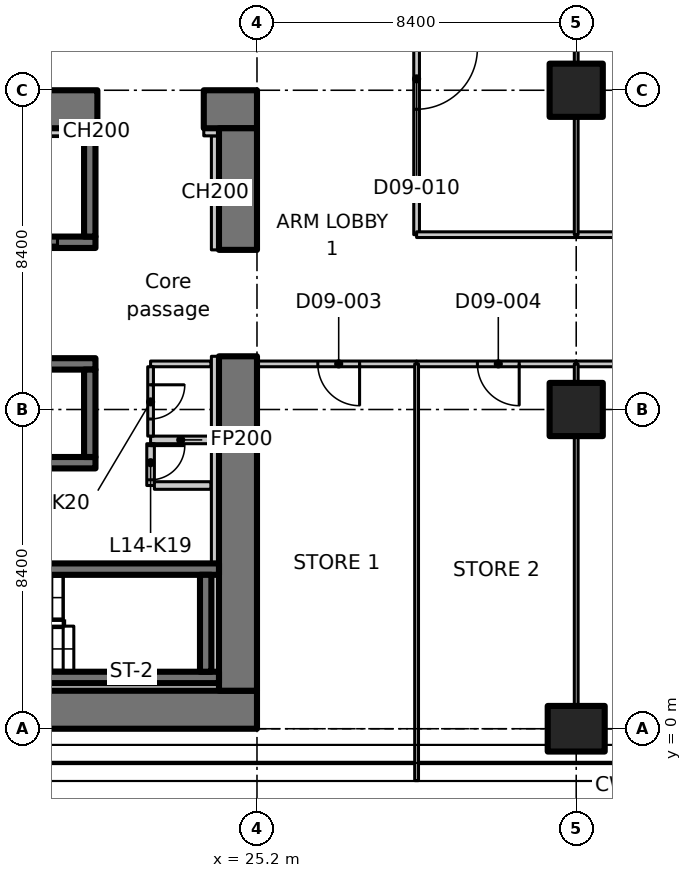
"""IFC4 building model, lengths in metres.
Left out: names, types, materials, properties, quantities, classifications, styles, units other than length and angle.
Written with IfcOpenShell. Run it as: python <this file> out.ifc"""

import sys

from ifc_helpers import new_model, si_unit, direction, frame, frame_2d, origin, origin_2d, place, context, subcontext, project, spatial, polyline, rectangle, outline, extrude, element, fill, save


model = new_model("IFC4")
c1 = context("Model", 3, precision=1e-05, world=origin(), true_north=direction((0.0, 1.0)))
c2 = subcontext(c1, "Body", "Model", "MODEL_VIEW")
j1 = project(units=[si_unit("LENGTHUNIT", "METRE"), si_unit("PLANEANGLEUNIT", "RADIAN")], contexts=[c1])
p1 = place(None, origin())
s1 = spatial("IfcSite", under=j1, at=p1, CompositionType="ELEMENT")
p2 = place(p1, origin())
s2 = spatial("IfcBuilding", under=s1, at=p2, CompositionType="ELEMENT")
p3 = place(p2, frame((0.0, 0.0, 65.3)))
s3 = spatial("IfcBuildingStorey", under=s2, at=p3, CompositionType="ELEMENT", Elevation=65.3)
p4 = place(p3, frame((33.6, 0.0, 0.0), z_axis=(0.0, 0.0, 1.0), x_axis=(0.0, 1.0, 0.0)))
e1 = element("IfcColumn", 1, at=p4, inside=s3, PredefinedType="COLUMN", context=c2, shape_type="SweptSolid", body=[
    extrude(rectangle(XDim=1.2, YDim=1.5, at=origin_2d()), origin(), (0.0, 0.0, 1.0), 3.35),
])
for number, where, z_axis, x_axis in (
    (2, (33.6, 8.4, 0.0), (0.0, 0.0, 1.0), (1.0, 0.0, 0.0)),
    (3, (33.6, 16.8, 0.0), (0.0, 0.0, 1.0), (1.0, 0.0, 0.0)),
):
    element("IfcColumn", number, at=place(p3, frame(where, z_axis=z_axis, x_axis=x_axis)), inside=s3, PredefinedType="COLUMN", context=c2, shape_type="SweptSolid", body=[
        extrude(rectangle(XDim=1.4, YDim=1.4, at=origin_2d()), origin(), (0.0, 0.0, 1.0), 3.35),
    ])
p5 = place(p3, frame((6.936, 0.5, 0.0), z_axis=(0.0, 0.0, 1.0), x_axis=(1.0, 0.0, 0.0)))
e4 = element("IfcWall", 4, at=p5, inside=s3, PredefinedType="SHEAR", context=c2, shape_type="SweptSolid", body=[
    extrude(rectangle(XDim=18.264, YDim=1.0, at=frame_2d((9.132, 0.0))), origin(), (0.0, 0.0, 1.0), 3.35),
])
p6 = place(p3, frame((-1.1, 16.3, 0.0), z_axis=(0.0, 0.0, 1.0), x_axis=(1.0, 0.0, 0.0)))
e5 = element("IfcWall", 5, at=p6, inside=s3, PredefinedType="SHEAR", context=c2, shape_type="SweptSolid", body=[
    extrude(rectangle(XDim=22.1, YDim=1.0, at=frame_2d((11.05, 0.0))), origin(), (0.0, 0.0, 1.0), 3.35),
])
p7 = place(p6, frame((3.15, 0.0, 0.0)))
e6 = element("IfcOpeningElement", 6, at=p7, cuts=e5, PredefinedType="OPENING", context=c2, shape_type="SweptSolid", body=[
    extrude(rectangle(XDim=1.1, YDim=2.3, at=frame_2d((0.55, 1.15))), frame((0.0, 0.51, 0.0), z_axis=(0.0, -1.0, 0.0), x_axis=(1.0, 0.0, 0.0)), (0.0, 0.0, 1.0), 1.02),
])
p8 = place(p3, frame((23.8, 16.3, 0.0), z_axis=(0.0, 0.0, 1.0), x_axis=(1.0, 0.0, 0.0)))
e7 = element("IfcWall", 7, at=p8, inside=s3, PredefinedType="SHEAR", context=c2, shape_type="SweptSolid", body=[
    extrude(rectangle(XDim=1.4, YDim=1.0, at=frame_2d((0.7, 0.0))), origin(), (0.0, 0.0, 1.0), 3.35),
])
p9 = place(p3, frame((24.7, 1.0, 0.0), z_axis=(0.0, 0.0, 1.0), x_axis=(0.0, 1.0, 0.0)))
e8 = element("IfcWall", 8, at=p9, inside=s3, PredefinedType="SHEAR", context=c2, shape_type="SweptSolid", body=[
    extrude(rectangle(XDim=8.8, YDim=1.0, at=frame_2d((4.4, 0.0))), origin(), (0.0, 0.0, 1.0), 3.35),
])
p10 = place(p3, frame((24.7, 12.6, 0.0), z_axis=(0.0, 0.0, 1.0), x_axis=(0.0, 1.0, 0.0)))
e9 = element("IfcWall", 9, at=p10, inside=s3, PredefinedType="SHEAR", context=c2, shape_type="SweptSolid", body=[
    extrude(rectangle(XDim=3.2, YDim=1.0, at=frame_2d((1.6, 0.0))), origin(), (0.0, 0.0, 1.0), 3.35),
])
p11 = place(p3, frame((24.1, 12.6, 0.0), z_axis=(0.0, 0.0, 1.0), x_axis=(0.0, 1.0, 0.0)))
e10 = element("IfcWall", 10, at=p11, inside=s3, PredefinedType="PARTITIONING", context=c2, shape_type="SweptSolid", body=[
    extrude(rectangle(XDim=3.0, YDim=0.2, at=frame_2d((1.5, 0.0))), origin(), (0.0, 0.0, 1.0), 3.35),
])
p12 = place(p3, frame((23.8, 15.7, 0.0), z_axis=(0.0, 0.0, 1.0), x_axis=(1.0, 0.0, 0.0)))
e11 = element("IfcWall", 11, at=p12, inside=s3, PredefinedType="PARTITIONING", context=c2, shape_type="SweptSolid", body=[
    extrude(rectangle(XDim=0.4, YDim=0.2, at=frame_2d((0.2, 0.0))), origin(), (0.0, 0.0, 1.0), 3.35),
])
p13 = place(p3, frame((1.0, 7.0, 0.0), z_axis=(0.0, 0.0, 1.0), x_axis=(1.0, 0.0, 0.0)))
e12 = element("IfcWall", 12, at=p13, inside=s3, PredefinedType="SHEAR", context=c2, shape_type="SweptSolid", body=[
    extrude(rectangle(XDim=19.95, YDim=0.3, at=frame_2d((9.975, 0.0))), origin(), (0.0, 0.0, 1.0), 3.35),
])
p14 = place(p3, frame((1.0, 9.6, 0.0), z_axis=(0.0, 0.0, 1.0), x_axis=(1.0, 0.0, 0.0)))
e13 = element("IfcWall", 13, at=p14, inside=s3, PredefinedType="SHEAR", context=c2, shape_type="SweptSolid", body=[
    extrude(rectangle(XDim=19.95, YDim=0.3, at=frame_2d((9.975, 0.0))), origin(), (0.0, 0.0, 1.0), 3.35),
])
p15 = place(p14, frame((1.05, 0.0, 0.0)))
e14 = element("IfcOpeningElement", 14, at=p15, cuts=e13, PredefinedType="OPENING", context=c2, shape_type="SweptSolid", body=[
    extrude(rectangle(XDim=1.1, YDim=2.3, at=frame_2d((0.55, 1.15))), frame((0.0, 0.16, 0.0), z_axis=(0.0, -1.0, 0.0), x_axis=(1.0, 0.0, 0.0)), (0.0, 0.0, 1.0), 0.32),
])
p16 = place(p14, frame((3.85, 0.0, 0.0)))
e15 = element("IfcOpeningElement", 15, at=p16, cuts=e13, PredefinedType="OPENING", context=c2, shape_type="SweptSolid", body=[
    extrude(rectangle(XDim=1.1, YDim=2.3, at=frame_2d((0.55, 1.15))), frame((0.0, 0.16, 0.0), z_axis=(0.0, -1.0, 0.0), x_axis=(1.0, 0.0, 0.0)), (0.0, 0.0, 1.0), 0.32),
])
p17 = place(p14, frame((6.65, 0.0, 0.0)))
e16 = element("IfcOpeningElement", 16, at=p17, cuts=e13, PredefinedType="OPENING", context=c2, shape_type="SweptSolid", body=[
    extrude(rectangle(XDim=1.1, YDim=2.3, at=frame_2d((0.55, 1.15))), frame((0.0, 0.16, 0.0), z_axis=(0.0, -1.0, 0.0), x_axis=(1.0, 0.0, 0.0)), (0.0, 0.0, 1.0), 0.32),
])
p18 = place(p14, frame((9.45, 0.0, 0.0)))
e17 = element("IfcOpeningElement", 17, at=p18, cuts=e13, PredefinedType="OPENING", context=c2, shape_type="SweptSolid", body=[
    extrude(rectangle(XDim=1.1, YDim=2.3, at=frame_2d((0.55, 1.15))), frame((0.0, 0.16, 0.0), z_axis=(0.0, -1.0, 0.0), x_axis=(1.0, 0.0, 0.0)), (0.0, 0.0, 1.0), 0.32),
])
p19 = place(p14, frame((12.25, 0.0, 0.0)))
e18 = element("IfcOpeningElement", 18, at=p19, cuts=e13, PredefinedType="OPENING", context=c2, shape_type="SweptSolid", body=[
    extrude(rectangle(XDim=1.1, YDim=2.3, at=frame_2d((0.55, 1.15))), frame((0.0, 0.16, 0.0), z_axis=(0.0, -1.0, 0.0), x_axis=(1.0, 0.0, 0.0)), (0.0, 0.0, 1.0), 0.32),
])
p20 = place(p14, frame((15.05, 0.0, 0.0)))
e19 = element("IfcOpeningElement", 19, at=p20, cuts=e13, PredefinedType="OPENING", context=c2, shape_type="SweptSolid", body=[
    extrude(rectangle(XDim=1.1, YDim=2.3, at=frame_2d((0.55, 1.15))), frame((0.0, 0.16, 0.0), z_axis=(0.0, -1.0, 0.0), x_axis=(1.0, 0.0, 0.0)), (0.0, 0.0, 1.0), 0.32),
])
p21 = place(p3, frame((20.8, 7.15, 0.0), z_axis=(0.0, 0.0, 1.0), x_axis=(0.0, 1.0, 0.0)))
e20 = element("IfcWall", 20, at=p21, inside=s3, PredefinedType="SHEAR", context=c2, shape_type="SweptSolid", body=[
    extrude(rectangle(XDim=2.3, YDim=0.3, at=frame_2d((1.15, 0.0))), origin(), (0.0, 0.0, 1.0), 3.35),
])
p22 = place(p3, frame((15.05, 12.8, 0.0), z_axis=(0.0, 0.0, 1.0), x_axis=(1.0, 0.0, 0.0)))
e21 = element("IfcWall", 21, at=p22, inside=s3, PredefinedType="SHEAR", context=c2, shape_type="SweptSolid", body=[
    extrude(rectangle(XDim=5.9, YDim=0.3, at=frame_2d((2.95, 0.0))), origin(), (0.0, 0.0, 1.0), 3.35),
])
p23 = place(p22, frame((3.8, 0.0, 0.0)))
e22 = element("IfcOpeningElement", 22, at=p23, cuts=e21, PredefinedType="OPENING", context=c2, shape_type="SweptSolid", body=[
    extrude(rectangle(XDim=1.1, YDim=2.3, at=frame_2d((0.55, 1.15))), frame((0.0, 0.16, 0.0), z_axis=(0.0, -1.0, 0.0), x_axis=(1.0, 0.0, 0.0)), (0.0, 0.0, 1.0), 0.32),
])
p24 = place(p3, frame((20.8, 12.95, 0.0), z_axis=(0.0, 0.0, 1.0), x_axis=(0.0, 1.0, 0.0)))
e23 = element("IfcWall", 23, at=p24, inside=s3, PredefinedType="SHEAR", context=c2, shape_type="SweptSolid", body=[
    extrude(rectangle(XDim=2.85, YDim=0.3, at=frame_2d((1.425, 0.0))), origin(), (0.0, 0.0, 1.0), 3.35),
])
p25 = place(p3, frame((15.8, 1.35, 0.0), z_axis=(0.0, 0.0, 1.0), x_axis=(1.0, 0.0, 0.0)))
e24 = element("IfcWall", 24, at=p25, inside=s3, PredefinedType="SHEAR", context=c2, shape_type="SweptSolid", body=[
    extrude(rectangle(XDim=8.4, YDim=0.3, at=frame_2d((4.2, 0.0))), origin(), (0.0, 0.0, 1.0), 3.35),
])
p26 = place(p3, frame((15.8, 4.2, 0.0), z_axis=(0.0, 0.0, 1.0), x_axis=(1.0, 0.0, 0.0)))
e25 = element("IfcWall", 25, at=p26, inside=s3, PredefinedType="SHEAR", context=c2, shape_type="SweptSolid", body=[
    extrude(rectangle(XDim=8.4, YDim=0.3, at=frame_2d((4.2, 0.0))), origin(), (0.0, 0.0, 1.0), 3.35),
])
p27 = place(p26, frame((0.4, 0.0, 0.0)))
e26 = element("IfcOpeningElement", 26, at=p27, cuts=e25, PredefinedType="OPENING", context=c2, shape_type="SweptSolid", body=[
    extrude(rectangle(XDim=1.0, YDim=2.1, at=frame_2d((0.5, 1.05))), frame((0.0, 0.16, 0.0), z_axis=(0.0, -1.0, 0.0), x_axis=(1.0, 0.0, 0.0)), (0.0, 0.0, 1.0), 0.32),
])
p28 = place(p3, frame((23.85, 1.5, 0.0), z_axis=(0.0, 0.0, 1.0), x_axis=(0.0, 1.0, 0.0)))
e27 = element("IfcWall", 27, at=p28, inside=s3, PredefinedType="SHEAR", context=c2, shape_type="SweptSolid", body=[
    extrude(rectangle(XDim=2.55, YDim=0.3, at=frame_2d((1.275, 0.0))), origin(), (0.0, 0.0, 1.0), 3.35),
])
p29 = place(p3, frame((23.988, 7.6, 0.0), z_axis=(0.0, 0.0, 1.0), x_axis=(-1.0, 0.0, 0.0)))
e28 = element("IfcWall", 28, at=p29, inside=s3, PredefinedType="PARTITIONING", context=c2, shape_type="SweptSolid", body=[
    extrude(rectangle(XDim=1.588, YDim=0.2, at=frame_2d((0.794, 0.0))), origin(), (0.0, 0.0, 1.0), 3.35),
])
p30 = place(p3, frame((22.4, 7.5, 0.0), z_axis=(0.0, 0.0, 1.0), x_axis=(0.0, -1.0, 0.0)))
e29 = element("IfcWall", 29, at=p30, inside=s3, PredefinedType="PARTITIONING", context=c2, shape_type="SweptSolid", body=[
    extrude(rectangle(XDim=1.1, YDim=0.2, at=frame_2d((0.55, 0.0))), origin(), (0.0, 0.0, 1.0), 3.35),
])
p31 = place(p30, frame((0.05, 0.0, 0.0)))
e30 = element("IfcOpeningElement", 30, at=p31, cuts=e29, PredefinedType="OPENING", context=c2, shape_type="SweptSolid", body=[
    extrude(rectangle(XDim=0.9, YDim=2.1, at=frame_2d((0.45, 1.05))), frame((0.0, 0.11, 0.0), z_axis=(0.0, -1.0, 0.0), x_axis=(1.0, 0.0, 0.0)), (0.0, 0.0, 1.0), 0.22),
])
p32 = place(p3, frame((22.5, 6.4, 0.0), z_axis=(0.0, 0.0, 1.0), x_axis=(1.0, 0.0, 0.0)))
e31 = element("IfcWall", 31, at=p32, inside=s3, PredefinedType="PARTITIONING", context=c2, shape_type="SweptSolid", body=[
    extrude(rectangle(XDim=1.488, YDim=0.2, at=frame_2d((0.744, 0.0))), origin(), (0.0, 0.0, 1.0), 3.35),
])
p33 = place(p3, frame((23.988, 9.6, 0.0), z_axis=(0.0, 0.0, 1.0), x_axis=(-1.0, 0.0, 0.0)))
e32 = element("IfcWall", 32, at=p33, inside=s3, PredefinedType="PARTITIONING", context=c2, shape_type="SweptSolid", body=[
    extrude(rectangle(XDim=1.588, YDim=0.15, at=frame_2d((0.794, 0.0))), origin(), (0.0, 0.0, 1.0), 3.35),
])
p34 = place(p3, frame((22.4, 9.525, 0.0), z_axis=(0.0, 0.0, 1.0), x_axis=(0.0, -1.0, 0.0)))
e33 = element("IfcWall", 33, at=p34, inside=s3, PredefinedType="PARTITIONING", context=c2, shape_type="SweptSolid", body=[
    extrude(rectangle(XDim=1.825, YDim=0.15, at=frame_2d((0.913, 0.0))), origin(), (0.0, 0.0, 1.0), 3.35),
])
p35 = place(p34, frame((0.475, 0.0, 0.0)))
e34 = element("IfcOpeningElement", 34, at=p35, cuts=e33, PredefinedType="OPENING", context=c2, shape_type="SweptSolid", body=[
    extrude(rectangle(XDim=0.9, YDim=2.1, at=frame_2d((0.45, 1.05))), frame((0.0, 0.085, 0.0), z_axis=(0.0, -1.0, 0.0), x_axis=(1.0, 0.0, 0.0)), (0.0, 0.0, 1.0), 0.17),
])
p36 = place(p3, frame((18.15, 15.7, 0.0), z_axis=(0.0, 0.0, 1.0), x_axis=(1.0, 0.0, 0.0)))
e35 = element("IfcWall", 35, at=p36, inside=s3, PredefinedType="PARTITIONING", context=c2, shape_type="SweptSolid", body=[
    extrude(rectangle(XDim=2.5, YDim=0.2, at=frame_2d((1.25, 0.0))), origin(), (0.0, 0.0, 1.0), 3.35),
])
p37 = place(p3, frame((20.95, 15.7, 0.0), z_axis=(0.0, 0.0, 1.0), x_axis=(1.0, 0.0, 0.0)))
e36 = element("IfcWall", 36, at=p37, inside=s3, PredefinedType="PARTITIONING", context=c2, shape_type="SweptSolid", body=[
    extrude(rectangle(XDim=0.05, YDim=0.2, at=frame_2d((0.025, 0.0))), origin(), (0.0, 0.0, 1.0), 3.35),
])
p38 = place(p3, frame((13.35, 1.1, 0.0), z_axis=(0.0, 0.0, 1.0), x_axis=(1.0, 0.0, 0.0)))
e37 = element("IfcWall", 37, at=p38, inside=s3, PredefinedType="PARTITIONING", context=c2, shape_type="SweptSolid", body=[
    extrude(rectangle(XDim=10.85, YDim=0.2, at=frame_2d((5.425, 0.0))), origin(), (0.0, 0.0, 1.0), 3.35),
])
p39 = place(p3, frame((24.1, 1.5, 0.0), z_axis=(0.0, 0.0, 1.0), x_axis=(0.0, 1.0, 0.0)))
e38 = element("IfcWall", 38, at=p39, inside=s3, PredefinedType="PARTITIONING", context=c2, shape_type="SweptSolid", body=[
    extrude(rectangle(XDim=2.55, YDim=0.2, at=frame_2d((1.275, 0.0))), origin(), (0.0, 0.0, 1.0), 3.35),
])
p40 = place(p3, frame((24.1, 4.35, 0.0), z_axis=(0.0, 0.0, 1.0), x_axis=(0.0, 1.0, 0.0)))
e39 = element("IfcWall", 39, at=p40, inside=s3, PredefinedType="PARTITIONING", context=c2, shape_type="SweptSolid", body=[
    extrude(rectangle(XDim=5.45, YDim=0.2, at=frame_2d((2.725, 0.0))), origin(), (0.0, 0.0, 1.0), 3.35),
])
p41 = place(p3, frame((29.4, 9.6, 0.0), z_axis=(0.0, 0.0, 1.0), x_axis=(-1.0, 0.0, 0.0)))
e40 = element("IfcWall", 40, at=p41, inside=s3, PredefinedType="PARTITIONING", context=c2, shape_type="SweptSolid", body=[
    extrude(rectangle(XDim=4.2, YDim=0.15, at=frame_2d((2.1, 0.0))), origin(), (0.0, 0.0, 1.0), 3.33),
])
p42 = place(p41, frame((1.5, 0.0, 0.0)))
e41 = element("IfcOpeningElement", 41, at=p42, cuts=e40, PredefinedType="OPENING", context=c2, shape_type="SweptSolid", body=[
    extrude(rectangle(XDim=1.1, YDim=2.1, at=frame_2d((0.55, 1.05))), frame((0.0, 0.085, 0.0), z_axis=(0.0, -1.0, 0.0), x_axis=(1.0, 0.0, 0.0)), (0.0, 0.0, 1.0), 0.17),
])
p43 = place(p3, frame((29.4, 21.2, 0.0), z_axis=(0.0, 0.0, 1.0), x_axis=(0.0, -1.0, 0.0)))
e42 = element("IfcWall", 42, at=p43, inside=s3, PredefinedType="PARTITIONING", context=c2, shape_type="SweptSolid", body=[
    extrude(rectangle(XDim=8.2, YDim=0.15, at=frame_2d((4.1, 0.0))), origin(), (0.0, 0.0, 1.0), 3.33),
])
p44 = place(p43, frame((3.3, 0.0, 0.0)))
e43 = element("IfcOpeningElement", 43, at=p44, cuts=e42, PredefinedType="OPENING", context=c2, shape_type="SweptSolid", body=[
    extrude(rectangle(XDim=1.6, YDim=2.1, at=frame_2d((0.8, 1.05))), frame((0.0, 0.085, 0.0), z_axis=(0.0, -1.0, 0.0), x_axis=(1.0, 0.0, 0.0)), (0.0, 0.0, 1.0), 0.17),
])
p45 = place(p3, frame((33.6, 9.6, 0.0), z_axis=(0.0, 0.0, 1.0), x_axis=(-1.0, 0.0, 0.0)))
e44 = element("IfcWall", 44, at=p45, inside=s3, PredefinedType="PARTITIONING", context=c2, shape_type="SweptSolid", body=[
    extrude(rectangle(XDim=4.2, YDim=0.15, at=frame_2d((2.1, 0.0))), origin(), (0.0, 0.0, 1.0), 3.33),
])
p46 = place(p45, frame((1.5, 0.0, 0.0)))
e45 = element("IfcOpeningElement", 45, at=p46, cuts=e44, PredefinedType="OPENING", context=c2, shape_type="SweptSolid", body=[
    extrude(rectangle(XDim=1.1, YDim=2.1, at=frame_2d((0.55, 1.05))), frame((0.0, 0.085, 0.0), z_axis=(0.0, -1.0, 0.0), x_axis=(1.0, 0.0, 0.0)), (0.0, 0.0, 1.0), 0.17),
])
p47 = place(p3, frame((42.0, 9.6, 0.0), z_axis=(0.0, 0.0, 1.0), x_axis=(-1.0, 0.0, 0.0)))
e46 = element("IfcWall", 46, at=p47, inside=s3, PredefinedType="PARTITIONING", context=c2, shape_type="SweptSolid", body=[
    extrude(rectangle(XDim=8.4, YDim=0.15, at=frame_2d((4.2, 0.0))), origin(), (0.0, 0.0, 1.0), 3.33),
])
p48 = place(p47, frame((3.3, 0.0, 0.0)))
e47 = element("IfcOpeningElement", 47, at=p48, cuts=e46, PredefinedType="OPENING", context=c2, shape_type="SweptSolid", body=[
    extrude(rectangle(XDim=1.6, YDim=2.1, at=frame_2d((0.8, 1.05))), frame((0.0, 0.085, 0.0), z_axis=(0.0, -1.0, 0.0), x_axis=(1.0, 0.0, 0.0)), (0.0, 0.0, 1.0), 0.17),
])
p49 = place(p3, frame((29.4, 13.0, 0.0), z_axis=(0.0, 0.0, 1.0), x_axis=(1.0, 0.0, 0.0)))
e48 = element("IfcWall", 48, at=p49, inside=s3, PredefinedType="PARTITIONING", context=c2, shape_type="SweptSolid", body=[
    extrude(rectangle(XDim=4.2, YDim=0.15, at=frame_2d((2.1, 0.0))), origin(), (0.0, 0.0, 1.0), 3.33),
])
p50 = place(p3, frame((33.6, 13.0, 0.0), z_axis=(0.0, 0.0, 1.0), x_axis=(1.0, 0.0, 0.0)))
e49 = element("IfcWall", 49, at=p50, inside=s3, PredefinedType="PARTITIONING", context=c2, shape_type="SweptSolid", body=[
    extrude(rectangle(XDim=4.2, YDim=0.15, at=frame_2d((2.1, 0.0))), origin(), (0.0, 0.0, 1.0), 3.33),
])
p51 = place(p50, frame((1.2, 0.0, 0.0)))
e50 = element("IfcOpeningElement", 50, at=p51, cuts=e49, PredefinedType="OPENING", context=c2, shape_type="SweptSolid", body=[
    extrude(rectangle(XDim=1.6, YDim=2.1, at=frame_2d((0.8, 1.05))), frame((0.0, 0.085, 0.0), z_axis=(0.0, -1.0, 0.0), x_axis=(1.0, 0.0, 0.0)), (0.0, 0.0, 1.0), 0.17),
])
p52 = place(p3, frame((29.4, 9.6, 0.0), z_axis=(0.0, 0.0, 1.0), x_axis=(0.0, -1.0, 0.0)))
e51 = element("IfcWall", 51, at=p52, inside=s3, PredefinedType="PARTITIONING", context=c2, shape_type="SweptSolid", body=[
    extrude(outline(polyline([(0.0, 0.0), (10.965, 0.0), (10.965, 3.33), (10.7, 3.33), (10.05, 3.33), (10.048, 2.98), (9.152, 2.98), (9.15, 3.33), (0.0, 3.33), (0.0, 0.0)])), frame((0.0, 0.05, 0.0), z_axis=(0.0, -1.0, 0.0), x_axis=(1.0, 0.0, 0.0)), (0.0, 0.0, 1.0), 0.1),
])
p53 = place(p3, frame((33.6, 9.6, 0.0), z_axis=(0.0, 0.0, 1.0), x_axis=(0.0, -1.0, 0.0)))
e52 = element("IfcWall", 52, at=p53, inside=s3, PredefinedType="PARTITIONING", context=c2, shape_type="SweptSolid", body=[
    extrude(rectangle(XDim=0.48, YDim=0.1, at=frame_2d((0.24, 0.0))), origin(), (0.0, 0.0, 1.0), 3.33),
])
p54 = place(p3, frame((33.6, 7.68, 0.0), z_axis=(0.0, 0.0, 1.0), x_axis=(0.0, -1.0, 0.0)))
e53 = element("IfcWall", 53, at=p54, inside=s3, PredefinedType="PARTITIONING", context=c2, shape_type="SweptSolid", body=[
    extrude(rectangle(XDim=7.06, YDim=0.1, at=frame_2d((3.53, 0.0))), origin(), (0.0, 0.0, 1.0), 3.33),
])
p55 = place(p3, frame((33.6, 24.58, 0.0), z_axis=(0.0, 0.0, 1.0), x_axis=(0.0, -1.0, 0.0)))
e54 = element("IfcWall", 54, at=p55, inside=s3, PredefinedType="PARTITIONING", context=c2, shape_type="SweptSolid", body=[
    extrude(rectangle(XDim=7.06, YDim=0.1, at=frame_2d((3.53, 0.0))), origin(), (0.0, 0.0, 1.0), 3.33),
])
p56 = place(p3, frame((33.6, 16.08, 0.0), z_axis=(0.0, 0.0, 1.0), x_axis=(0.0, -1.0, 0.0)))
e55 = element("IfcWall", 55, at=p56, inside=s3, PredefinedType="PARTITIONING", context=c2, shape_type="SweptSolid", body=[
    extrude(rectangle(XDim=3.08, YDim=0.1, at=frame_2d((1.54, 0.0))), origin(), (0.0, 0.0, 1.0), 3.33),
])
p57 = place(p23, origin())
e56 = element("IfcDoor", 56, at=p57, inside=s3, OperationType="SLIDING_TO_LEFT", PredefinedType="DOOR", context=c2, shape_type="SweptSolid", body=[
    extrude(rectangle(XDim=1.1, YDim=2.3, at=frame_2d((0.55, 1.15))), frame((0.0, 0.025, 0.0), z_axis=(0.0, -1.0, 0.0), x_axis=(1.0, 0.0, 0.0)), (0.0, 0.0, 1.0), 0.05),
])
fill(e22, e56)
p58 = place(p31, origin())
e57 = element("IfcDoor", 57, at=p58, inside=s3, OperationType="SINGLE_SWING_RIGHT", PredefinedType="DOOR", context=c2, shape_type="SweptSolid", body=[
    extrude(rectangle(XDim=0.9, YDim=2.1, at=frame_2d((0.45, 1.05))), frame((0.0, 0.025, 0.0), z_axis=(0.0, -1.0, 0.0), x_axis=(1.0, 0.0, 0.0)), (0.0, 0.0, 1.0), 0.05),
])
fill(e30, e57)
p59 = place(p35, origin())
e58 = element("IfcDoor", 58, at=p59, inside=s3, OperationType="SINGLE_SWING_LEFT", PredefinedType="DOOR", context=c2, shape_type="SweptSolid", body=[
    extrude(rectangle(XDim=0.9, YDim=2.1, at=frame_2d((0.45, 1.05))), frame((0.0, 0.025, 0.0), z_axis=(0.0, -1.0, 0.0), x_axis=(1.0, 0.0, 0.0)), (0.0, 0.0, 1.0), 0.05),
])
fill(e34, e58)
p60 = place(p42, origin())
e59 = element("IfcDoor", 59, at=p60, inside=s3, OperationType="SINGLE_SWING_LEFT", PredefinedType="DOOR", context=c2, shape_type="SweptSolid", body=[
    extrude(rectangle(XDim=1.1, YDim=2.1, at=frame_2d((0.55, 1.05))), frame((0.0, 0.025, 0.0), z_axis=(0.0, -1.0, 0.0), x_axis=(1.0, 0.0, 0.0)), (0.0, 0.0, 1.0), 0.05),
])
fill(e41, e59)
p61 = place(p46, origin())
e60 = element("IfcDoor", 60, at=p61, inside=s3, OperationType="SINGLE_SWING_LEFT", PredefinedType="DOOR", context=c2, shape_type="SweptSolid", body=[
    extrude(rectangle(XDim=1.1, YDim=2.1, at=frame_2d((0.55, 1.05))), frame((0.0, 0.025, 0.0), z_axis=(0.0, -1.0, 0.0), x_axis=(1.0, 0.0, 0.0)), (0.0, 0.0, 1.0), 0.05),
])
fill(e45, e60)
p62 = place(p44, origin())
e61 = element("IfcDoor", 61, at=p62, inside=s3, OperationType="DOUBLE_DOOR_SINGLE_SWING", PredefinedType="DOOR", context=c2, shape_type="SweptSolid", body=[
    extrude(rectangle(XDim=1.6, YDim=2.1, at=frame_2d((0.8, 1.05))), frame((0.0, 0.025, 0.0), z_axis=(0.0, -1.0, 0.0), x_axis=(1.0, 0.0, 0.0)), (0.0, 0.0, 1.0), 0.05),
])
fill(e43, e61)
save(model, sys.argv[1])
